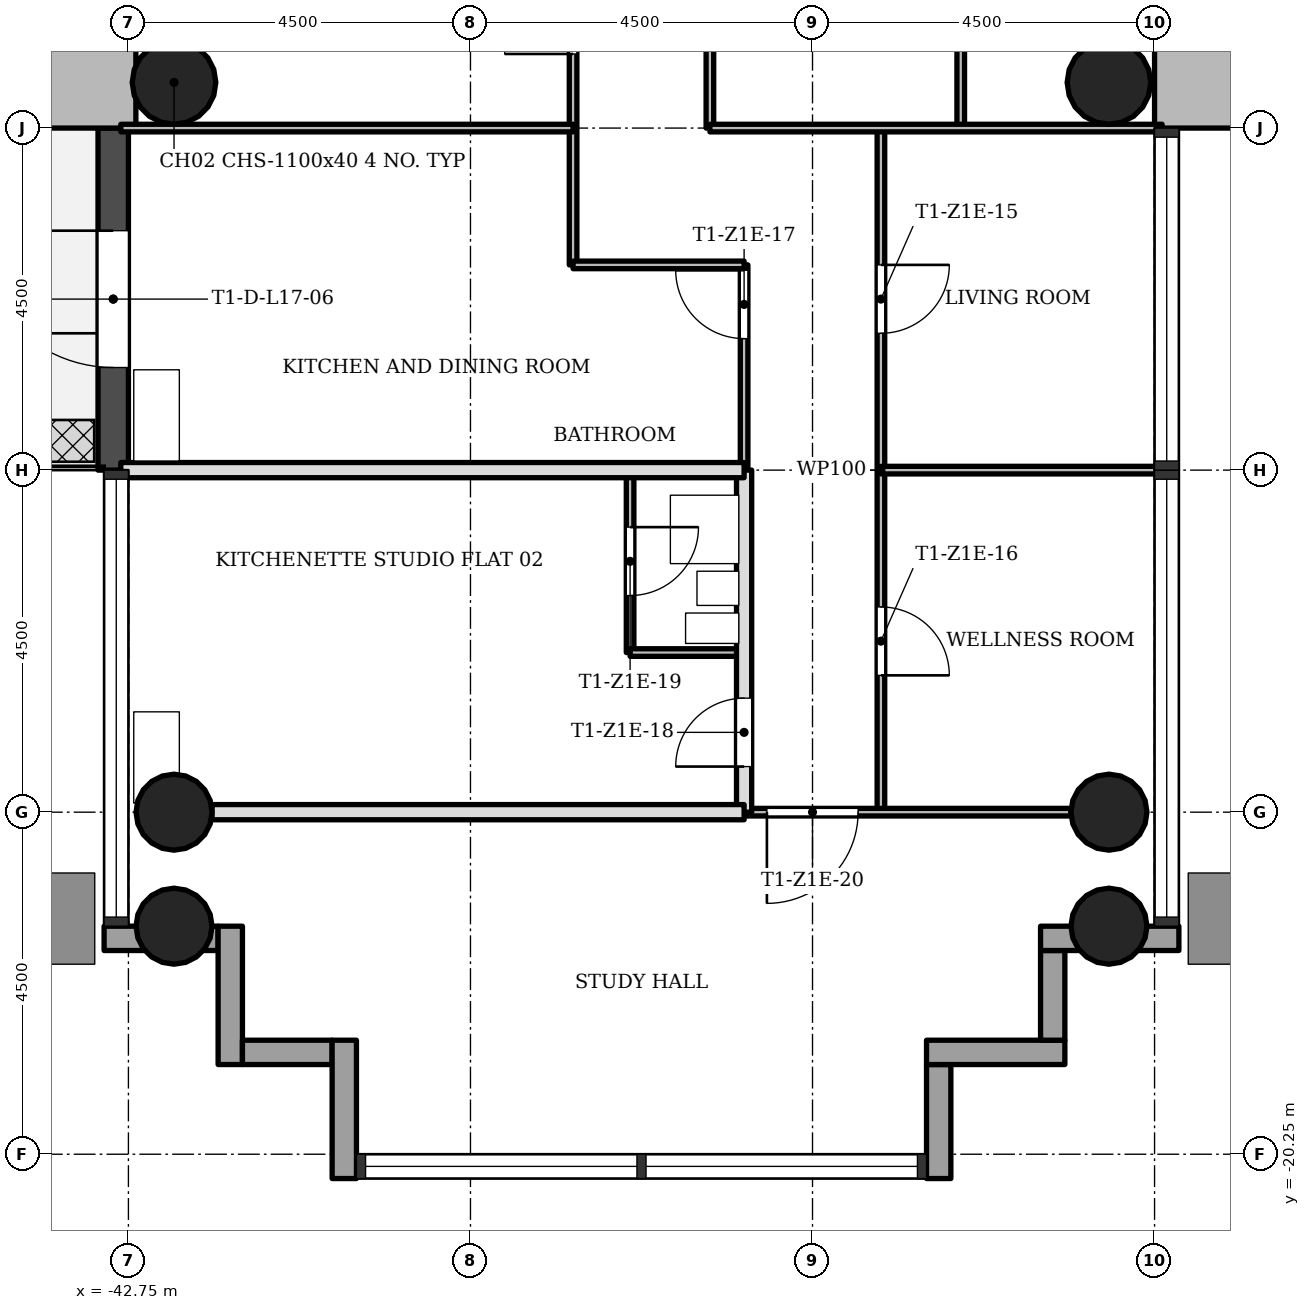
"""IFC4 building model, lengths in metres.
Left out: names, types, materials, properties, quantities, classifications, styles, units other than length and angle.
Written with IfcOpenShell. Run it as: python <this file> out.ifc"""

import sys

from ifc_helpers import new_model, si_unit, direction, frame, frame_2d, origin, origin_2d, place, context, subcontext, project, spatial, rectangle, hollow_circle, extrude, element, fill, save


model = new_model("IFC4")
c1 = context("Model", 3, precision=1e-05, world=origin(), true_north=direction((0.0, 1.0)))
c2 = subcontext(c1, "Body", "Model", "MODEL_VIEW")
j1 = project(units=[si_unit("LENGTHUNIT", "METRE"), si_unit("PLANEANGLEUNIT", "RADIAN")], contexts=[c1])
p1 = place(None, origin())
s1 = spatial("IfcSite", under=j1, at=p1, CompositionType="ELEMENT")
p2 = place(p1, origin())
s2 = spatial("IfcBuilding", under=s1, at=p2, CompositionType="ELEMENT")
p3 = place(p2, frame((0.0, 0.0, 65.3)))
s3 = spatial("IfcBuildingStorey", under=s2, at=p3, CompositionType="ELEMENT", Elevation=65.3)
p4 = place(p3, frame((-28.7, 5.65, 0.0), z_axis=(0.0, 0.0, 1.0), x_axis=(0.0, -1.0, 0.0)))
e1 = element("IfcWall", 1, at=p4, inside=s3, PredefinedType="SHEAR", context=c2, shape_type="SweptSolid", body=[
    extrude(rectangle(XDim=12.4, YDim=1.1, at=frame_2d((6.2, 0.0))), origin(), (0.0, 0.0, 1.0), 3.4),
])
p5 = place(p4, frame((4.75, 0.0, 0.0)))
e2 = element("IfcOpeningElement", 2, at=p5, cuts=e1, PredefinedType="OPENING", context=c2, shape_type="SweptSolid", body=[
    extrude(rectangle(XDim=1.8, YDim=2.1, at=frame_2d((0.9, 1.05))), frame((0.0, 0.56, 0.0), z_axis=(0.0, -1.0, 0.0), x_axis=(1.0, 0.0, 0.0)), (0.0, 0.0, 1.0), 1.12),
])
p6 = place(p3, frame((-50.65, -6.2, 0.0), z_axis=(0.0, 0.0, 1.0), x_axis=(1.0, 0.0, 0.0)))
e3 = element("IfcWall", 3, at=p6, inside=s3, PredefinedType="SHEAR", context=c2, shape_type="SweptSolid", body=[
    extrude(rectangle(XDim=7.998, YDim=1.1, at=frame_2d((3.999, 0.0))), origin(), (0.0, 0.0, 1.0), 3.4),
])
for number, where, z_axis, x_axis in (
    (4, (-42.15, -15.75, 0.0), (0.0, 0.0, 1.0), (1.0, 0.0, 0.0)),
    (5, (-29.85, -15.75, 0.0), (0.0, 0.0, 1.0), (1.0, 0.0, 0.0)),
    (6, (-42.15, -17.25, 0.0), (0.0, 0.0, 1.0), (1.0, 0.0, 0.0)),
    (7, (-29.85, -17.25, 0.0), (0.0, 0.0, 1.0), (1.0, 0.0, 0.0)),
):
    element("IfcColumn", number, at=place(p3, frame(where, z_axis=z_axis, x_axis=x_axis)), inside=s3, PredefinedType="COLUMN", context=c2, shape_type="SweptSolid", body=[
        extrude(hollow_circle(Radius=0.5, WallThickness=0.036, at=origin_2d()), origin(), (0.0, 0.0, 1.0), 3.4),
    ])
for number, where, z_axis, x_axis in (
    (8, (-42.15, -6.15, 0.0), (0.0, 0.0, 1.0), (1.0, 0.0, 0.0)),
    (9, (-29.85, -6.15, 0.0), (0.0, 0.0, 1.0), (1.0, 0.0, 0.0)),
):
    element("IfcColumn", number, at=place(p3, frame(where, z_axis=z_axis, x_axis=x_axis)), inside=s3, PredefinedType="COLUMN", context=c2, shape_type="SweptSolid", body=[
        extrude(hollow_circle(Radius=0.55, WallThickness=0.04, at=origin_2d()), origin(), (0.0, 0.0, 1.0), 3.4),
    ])
p7 = place(p3, frame((-42.95, -6.75, -0.02), z_axis=(0.0, 0.0, 1.0), x_axis=(0.0, -1.0, 0.0)))
e10 = element("IfcWall", 10, at=p7, inside=s3, PredefinedType="STANDARD", context=c2, shape_type="SweptSolid", body=[
    extrude(rectangle(XDim=4.5, YDim=0.4, at=frame_2d((2.25, 0.0))), origin(), (0.0, 0.0, 1.0), 3.12),
])
p8 = place(p7, frame((1.35, 0.0, 0.02)))
e11 = element("IfcOpeningElement", 11, at=p8, cuts=e10, PredefinedType="OPENING", context=c2, shape_type="SweptSolid", body=[
    extrude(rectangle(XDim=1.8, YDim=2.1, at=frame_2d((0.9, 1.05))), frame((0.0, 0.21, 0.0), z_axis=(0.0, -1.0, 0.0), x_axis=(1.0, 0.0, 0.0)), (0.0, 0.0, 1.0), 0.42),
])
p9 = place(p3, frame((-43.07, -17.41, -0.3), z_axis=(0.0, 0.0, 1.0), x_axis=(1.0, 0.0, 0.0)))
e12 = element("IfcWall", 12, at=p9, inside=s3, PredefinedType="STANDARD", context=c2, shape_type="SweptSolid", body=[
    extrude(rectangle(XDim=1.5, YDim=0.32, at=frame_2d((0.75, 0.0))), origin(), (0.0, 0.0, 1.0), 3.4),
])
p10 = place(p3, frame((-41.41, -17.25, -0.3), z_axis=(0.0, 0.0, 1.0), x_axis=(0.0, -1.0, 0.0)))
e13 = element("IfcWall", 13, at=p10, inside=s3, PredefinedType="STANDARD", context=c2, shape_type="SweptSolid", body=[
    extrude(rectangle(XDim=1.82, YDim=0.32, at=frame_2d((0.91, 0.0))), origin(), (0.0, 0.0, 1.0), 3.4),
])
p11 = place(p3, frame((-41.25, -18.91, -0.3), z_axis=(0.0, 0.0, 1.0), x_axis=(1.0, 0.0, 0.0)))
e14 = element("IfcWall", 14, at=p11, inside=s3, PredefinedType="STANDARD", context=c2, shape_type="SweptSolid", body=[
    extrude(rectangle(XDim=1.18, YDim=0.32, at=frame_2d((0.59, 0.0))), origin(), (0.0, 0.0, 1.0), 3.4),
])
p12 = place(p3, frame((-39.91, -18.75, -0.3), z_axis=(0.0, 0.0, 1.0), x_axis=(0.0, -1.0, 0.0)))
e15 = element("IfcWall", 15, at=p12, inside=s3, PredefinedType="STANDARD", context=c2, shape_type="SweptSolid", body=[
    extrude(rectangle(XDim=1.82, YDim=0.32, at=frame_2d((0.91, 0.0))), origin(), (0.0, 0.0, 1.0), 3.4),
])
p13 = place(p3, frame((-32.09, -20.57, -0.3), z_axis=(0.0, 0.0, 1.0), x_axis=(0.0, 1.0, 0.0)))
e16 = element("IfcWall", 16, at=p13, inside=s3, PredefinedType="STANDARD", context=c2, shape_type="SweptSolid", body=[
    extrude(rectangle(XDim=1.5, YDim=0.32, at=frame_2d((0.75, 0.0))), origin(), (0.0, 0.0, 1.0), 3.4),
])
p14 = place(p3, frame((-32.25, -18.91, -0.3), z_axis=(0.0, 0.0, 1.0), x_axis=(1.0, 0.0, 0.0)))
e17 = element("IfcWall", 17, at=p14, inside=s3, PredefinedType="STANDARD", context=c2, shape_type="SweptSolid", body=[
    extrude(rectangle(XDim=1.82, YDim=0.32, at=frame_2d((0.91, 0.0))), origin(), (0.0, 0.0, 1.0), 3.4),
])
p15 = place(p3, frame((-30.59, -18.75, -0.3), z_axis=(0.0, 0.0, 1.0), x_axis=(0.0, 1.0, 0.0)))
e18 = element("IfcWall", 18, at=p15, inside=s3, PredefinedType="STANDARD", context=c2, shape_type="SweptSolid", body=[
    extrude(rectangle(XDim=1.18, YDim=0.32, at=frame_2d((0.59, 0.0))), origin(), (0.0, 0.0, 1.0), 3.4),
])
p16 = place(p3, frame((-30.75, -17.41, -0.3), z_axis=(0.0, 0.0, 1.0), x_axis=(1.0, 0.0, 0.0)))
e19 = element("IfcWall", 19, at=p16, inside=s3, PredefinedType="STANDARD", context=c2, shape_type="SweptSolid", body=[
    extrude(rectangle(XDim=1.82, YDim=0.32, at=frame_2d((0.91, 0.0))), origin(), (0.0, 0.0, 1.0), 3.4),
])
p17 = place(p3, frame((-36.9, -8.55, 0.0), z_axis=(0.0, 0.0, 1.0), x_axis=(0.0, 1.0, 0.0)))
e20 = element("IfcWall", 20, at=p17, inside=s3, PredefinedType="PARTITIONING", context=c2, shape_type="SweptSolid", body=[
    extrude(rectangle(XDim=7.05, YDim=0.1, at=frame_2d((3.525, 0.0))), origin(), (0.0, 0.0, 1.0), 3.0),
])
p18 = place(p17, frame((5.4, 0.0, 0.0)))
e21 = element("IfcOpeningElement", 21, at=p18, cuts=e20, PredefinedType="OPENING", context=c2, shape_type="SweptSolid", body=[
    extrude(rectangle(XDim=0.9, YDim=2.1, at=frame_2d((0.45, 1.05))), frame((0.0, 0.06, 0.0), z_axis=(0.0, -1.0, 0.0), x_axis=(1.0, 0.0, 0.0)), (0.0, 0.0, 1.0), 0.12),
])
p19 = place(p17, frame((2.775, 0.0, 0.0)))
e22 = element("IfcOpeningElement", 22, at=p19, cuts=e20, PredefinedType="OPENING", context=c2, shape_type="SweptSolid", body=[
    extrude(rectangle(XDim=0.9, YDim=2.1, at=frame_2d((0.45, 1.05))), frame((0.0, 0.06, 0.0), z_axis=(0.0, -1.0, 0.0), x_axis=(1.0, 0.0, 0.0)), (0.0, 0.0, 1.0), 0.12),
])
p20 = place(p3, frame((-36.15, -13.65, 0.0), z_axis=(0.0, 0.0, 1.0), x_axis=(0.0, 1.0, 0.0)))
e23 = element("IfcWall", 23, at=p20, inside=s3, PredefinedType="PARTITIONING", context=c2, shape_type="SweptSolid", body=[
    extrude(rectangle(XDim=2.4, YDim=0.1, at=frame_2d((1.2, 0.0))), origin(), (0.0, 0.0, 1.0), 3.0),
])
p21 = place(p20, frame((0.75, 0.0, 0.0)))
e24 = element("IfcOpeningElement", 24, at=p21, cuts=e23, PredefinedType="OPENING", context=c2, shape_type="SweptSolid", body=[
    extrude(rectangle(XDim=0.9, YDim=2.1, at=frame_2d((0.45, 1.05))), frame((0.0, 0.06, 0.0), z_axis=(0.0, -1.0, 0.0), x_axis=(1.0, 0.0, 0.0)), (0.0, 0.0, 1.0), 0.12),
])
p22 = place(p3, frame((-35.1, -6.75, 0.0), z_axis=(0.0, 0.0, 1.0), x_axis=(0.0, 1.0, 0.0)))
e25 = element("IfcWall", 25, at=p22, inside=s3, PredefinedType="PARTITIONING", context=c2, shape_type="SweptSolid", body=[
    extrude(rectangle(XDim=5.25, YDim=0.1, at=frame_2d((2.625, 0.0))), origin(), (0.0, 0.0, 1.0), 3.0),
])
p23 = place(p22, frame((2.175, 0.0, 0.0)))
e26 = element("IfcOpeningElement", 26, at=p23, cuts=e25, PredefinedType="OPENING", context=c2, shape_type="SweptSolid", body=[
    extrude(rectangle(XDim=0.9, YDim=2.1, at=frame_2d((0.45, 1.05))), frame((0.0, 0.06, 0.0), z_axis=(0.0, -1.0, 0.0), x_axis=(1.0, 0.0, 0.0)), (0.0, 0.0, 1.0), 0.12),
])
p24 = place(p3, frame((-34.65, -11.25, 0.0), z_axis=(0.0, 0.0, 1.0), x_axis=(0.0, 1.0, 0.0)))
e27 = element("IfcWall", 27, at=p24, inside=s3, PredefinedType="PARTITIONING", context=c2, shape_type="SweptSolid", body=[
    extrude(rectangle(XDim=2.7, YDim=0.1, at=frame_2d((1.35, 0.0))), origin(), (0.0, 0.0, 1.0), 3.0),
])
p25 = place(p24, frame((1.73, 0.0, 0.0)))
e28 = element("IfcOpeningElement", 28, at=p25, cuts=e27, PredefinedType="OPENING", context=c2, shape_type="SweptSolid", body=[
    extrude(rectangle(XDim=0.9, YDim=2.1, at=frame_2d((0.45, 1.05))), frame((0.0, 0.06, 0.0), z_axis=(0.0, -1.0, 0.0), x_axis=(1.0, 0.0, 0.0)), (0.0, 0.0, 1.0), 0.12),
])
p26 = place(p3, frame((-34.65, -15.75, 0.0), z_axis=(0.0, 0.0, 1.0), x_axis=(0.0, 1.0, 0.0)))
e29 = element("IfcWall", 29, at=p26, inside=s3, PredefinedType="SOLIDWALL", context=c2, shape_type="SweptSolid", body=[
    extrude(rectangle(XDim=4.5, YDim=0.2, at=frame_2d((2.25, 0.0))), origin(), (0.0, 0.0, 1.0), 3.0),
])
p27 = place(p26, frame((0.6, 0.0, 0.0)))
e30 = element("IfcOpeningElement", 30, at=p27, cuts=e29, PredefinedType="OPENING", context=c2, shape_type="SweptSolid", body=[
    extrude(rectangle(XDim=0.9, YDim=2.1, at=frame_2d((0.45, 1.05))), frame((0.0, 0.11, 0.0), z_axis=(0.0, -1.0, 0.0), x_axis=(1.0, 0.0, 0.0)), (0.0, 0.0, 1.0), 0.22),
])
p28 = place(p3, frame((-32.85, -15.75, 0.0), z_axis=(0.0, 0.0, 1.0), x_axis=(0.0, 1.0, 0.0)))
e31 = element("IfcWall", 31, at=p28, inside=s3, PredefinedType="PARTITIONING", context=c2, shape_type="SweptSolid", body=[
    extrude(rectangle(XDim=9.0, YDim=0.1, at=frame_2d((4.5, 0.0))), origin(), (0.0, 0.0, 1.0), 3.0),
])
p29 = place(p28, frame((6.3, 0.0, 0.0)))
e32 = element("IfcOpeningElement", 32, at=p29, cuts=e31, PredefinedType="OPENING", context=c2, shape_type="SweptSolid", body=[
    extrude(rectangle(XDim=0.9, YDim=2.1, at=frame_2d((0.45, 1.05))), frame((0.0, 0.06, 0.0), z_axis=(0.0, -1.0, 0.0), x_axis=(1.0, 0.0, 0.0)), (0.0, 0.0, 1.0), 0.12),
])
p30 = place(p28, frame((1.8, 0.0, 0.0)))
e33 = element("IfcOpeningElement", 33, at=p30, cuts=e31, PredefinedType="OPENING", context=c2, shape_type="SweptSolid", body=[
    extrude(rectangle(XDim=0.9, YDim=2.1, at=frame_2d((0.45, 1.05))), frame((0.0, 0.06, 0.0), z_axis=(0.0, -1.0, 0.0), x_axis=(1.0, 0.0, 0.0)), (0.0, 0.0, 1.0), 0.12),
])
p31 = place(p3, frame((-31.8, -6.75, 0.0), z_axis=(0.0, 0.0, 1.0), x_axis=(0.0, 1.0, 0.0)))
e34 = element("IfcWall", 34, at=p31, inside=s3, PredefinedType="PARTITIONING", context=c2, shape_type="SweptSolid", body=[
    extrude(rectangle(XDim=5.25, YDim=0.1, at=frame_2d((2.625, 0.0))), origin(), (0.0, 0.0, 1.0), 3.0),
])
p32 = place(p3, frame((-34.65, -15.75, 0.0), z_axis=(0.0, 0.0, 1.0), x_axis=(1.0, 0.0, 0.0)))
e35 = element("IfcWall", 35, at=p32, inside=s3, PredefinedType="PARTITIONING", context=c2, shape_type="SweptSolid", body=[
    extrude(rectangle(XDim=4.3, YDim=0.1, at=frame_2d((2.15, 0.0))), origin(), (0.0, 0.0, 1.0), 3.0),
])
p33 = place(p32, frame((0.3, 0.0, 0.0)))
e36 = element("IfcOpeningElement", 36, at=p33, cuts=e35, PredefinedType="OPENING", context=c2, shape_type="SweptSolid", body=[
    extrude(rectangle(XDim=1.2, YDim=2.1, at=frame_2d((0.6, 1.05))), frame((0.0, 0.06, 0.0), z_axis=(0.0, -1.0, 0.0), x_axis=(1.0, 0.0, 0.0)), (0.0, 0.0, 1.0), 0.12),
])
p34 = place(p3, frame((-41.65, -15.75, 0.0), z_axis=(0.0, 0.0, 1.0), x_axis=(1.0, 0.0, 0.0)))
e37 = element("IfcWall", 37, at=p34, inside=s3, PredefinedType="SOLIDWALL", context=c2, shape_type="SweptSolid", body=[
    extrude(rectangle(XDim=7.0, YDim=0.2, at=frame_2d((3.5, 0.0))), origin(), (0.0, 0.0, 1.0), 3.0),
])
p35 = place(p3, frame((-36.15, -13.65, 0.0), z_axis=(0.0, 0.0, 1.0), x_axis=(1.0, 0.0, 0.0)))
e38 = element("IfcWall", 38, at=p35, inside=s3, PredefinedType="PARTITIONING", context=c2, shape_type="SweptSolid", body=[
    extrude(rectangle(XDim=1.5, YDim=0.1, at=frame_2d((0.75, 0.0))), origin(), (0.0, 0.0, 1.0), 3.0),
])
p36 = place(p3, frame((-32.85, -11.25, 0.0), z_axis=(0.0, 0.0, 1.0), x_axis=(1.0, 0.0, 0.0)))
e39 = element("IfcWall", 39, at=p36, inside=s3, PredefinedType="PARTITIONING", context=c2, shape_type="SweptSolid", body=[
    extrude(rectangle(XDim=3.7, YDim=0.1, at=frame_2d((1.85, 0.0))), origin(), (0.0, 0.0, 1.0), 3.0),
])
p37 = place(p3, frame((-42.85, -11.25, 0.0), z_axis=(0.0, 0.0, 1.0), x_axis=(1.0, 0.0, 0.0)))
e40 = element("IfcWall", 40, at=p37, inside=s3, PredefinedType="SOLIDWALL", context=c2, shape_type="SweptSolid", body=[
    extrude(rectangle(XDim=8.2, YDim=0.2, at=frame_2d((4.1, 0.0))), origin(), (0.0, 0.0, 1.0), 3.0),
])
p38 = place(p3, frame((-36.9, -8.55, 0.0), z_axis=(0.0, 0.0, 1.0), x_axis=(1.0, 0.0, 0.0)))
e41 = element("IfcWall", 41, at=p38, inside=s3, PredefinedType="PARTITIONING", context=c2, shape_type="SweptSolid", body=[
    extrude(rectangle(XDim=2.25, YDim=0.1, at=frame_2d((1.125, 0.0))), origin(), (0.0, 0.0, 1.0), 3.0),
])
for number, where, z_axis, x_axis in (
    (42, (-42.85, -6.75, 0.0), (0.0, 0.0, 1.0), (1.0, 0.0, 0.0)),
    (43, (-35.1, -6.75, 0.0), (0.0, 0.0, 1.0), (1.0, 0.0, 0.0)),
):
    element("IfcWall", number, at=place(p3, frame(where, z_axis=z_axis, x_axis=x_axis)), inside=s3, PredefinedType="PARTITIONING", context=c2, shape_type="SweptSolid", body=[
        extrude(rectangle(XDim=5.95, YDim=0.1, at=frame_2d((2.975, 0.0))), origin(), (0.0, 0.0, 1.0), 3.0),
    ])
p39 = place(p8, origin())
e44 = element("IfcDoor", 44, at=p39, inside=s3, OperationType="SINGLE_SWING_LEFT", PredefinedType="DOOR", context=c2, shape_type="SweptSolid", body=[
    extrude(rectangle(XDim=1.8, YDim=2.1, at=frame_2d((0.9, 1.05))), frame((0.0, 0.025, 0.0), z_axis=(0.0, -1.0, 0.0), x_axis=(1.0, 0.0, 0.0)), (0.0, 0.0, 1.0), 0.05),
])
fill(e11, e44)
p40 = place(p19, origin())
e45 = element("IfcDoor", 45, at=p40, inside=s3, OperationType="SINGLE_SWING_RIGHT", PredefinedType="DOOR", context=c2, shape_type="SweptSolid", body=[
    extrude(rectangle(XDim=0.9, YDim=2.1, at=frame_2d((0.45, 1.05))), frame((0.0, 0.025, 0.0), z_axis=(0.0, -1.0, 0.0), x_axis=(1.0, 0.0, 0.0)), (0.0, 0.0, 1.0), 0.05),
])
fill(e22, e45)
p41 = place(p29, origin())
e46 = element("IfcDoor", 46, at=p41, inside=s3, OperationType="SINGLE_SWING_RIGHT", PredefinedType="DOOR", context=c2, shape_type="SweptSolid", body=[
    extrude(rectangle(XDim=0.9, YDim=2.1, at=frame_2d((0.45, 1.05))), frame((0.0, 0.025, 0.0), z_axis=(0.0, -1.0, 0.0), x_axis=(1.0, 0.0, 0.0)), (0.0, 0.0, 1.0), 0.05),
])
fill(e32, e46)
p42 = place(p30, origin())
e47 = element("IfcDoor", 47, at=p42, inside=s3, OperationType="SINGLE_SWING_LEFT", PredefinedType="DOOR", context=c2, shape_type="SweptSolid", body=[
    extrude(rectangle(XDim=0.9, YDim=2.1, at=frame_2d((0.45, 1.05))), frame((0.0, 0.025, 0.0), z_axis=(0.0, -1.0, 0.0), x_axis=(1.0, 0.0, 0.0)), (0.0, 0.0, 1.0), 0.05),
])
fill(e33, e47)
p43 = place(p25, origin())
e48 = element("IfcDoor", 48, at=p43, inside=s3, OperationType="SINGLE_SWING_LEFT", PredefinedType="DOOR", context=c2, shape_type="SweptSolid", body=[
    extrude(rectangle(XDim=0.9, YDim=2.1, at=frame_2d((0.45, 1.05))), frame((0.0, 0.025, 0.0), z_axis=(0.0, -1.0, 0.0), x_axis=(1.0, 0.0, 0.0)), (0.0, 0.0, 1.0), 0.05),
])
fill(e28, e48)
p44 = place(p27, origin())
e49 = element("IfcDoor", 49, at=p44, inside=s3, OperationType="SINGLE_SWING_RIGHT", PredefinedType="DOOR", context=c2, shape_type="SweptSolid", body=[
    extrude(rectangle(XDim=0.9, YDim=2.1, at=frame_2d((0.45, 1.05))), frame((0.0, 0.025, 0.0), z_axis=(0.0, -1.0, 0.0), x_axis=(1.0, 0.0, 0.0)), (0.0, 0.0, 1.0), 0.05),
])
fill(e30, e49)
p45 = place(p21, origin())
e50 = element("IfcDoor", 50, at=p45, inside=s3, OperationType="SINGLE_SWING_RIGHT", PredefinedType="DOOR", context=c2, shape_type="SweptSolid", body=[
    extrude(rectangle(XDim=0.9, YDim=2.1, at=frame_2d((0.45, 1.05))), frame((0.0, 0.025, 0.0), z_axis=(0.0, -1.0, 0.0), x_axis=(1.0, 0.0, 0.0)), (0.0, 0.0, 1.0), 0.05),
])
fill(e24, e50)
p46 = place(p33, origin())
e51 = element("IfcDoor", 51, at=p46, inside=s3, OperationType="SINGLE_SWING_LEFT", PredefinedType="DOOR", context=c2, shape_type="SweptSolid", body=[
    extrude(rectangle(XDim=1.2, YDim=2.1, at=frame_2d((0.6, 1.05))), frame((0.0, 0.025, 0.0), z_axis=(0.0, -1.0, 0.0), x_axis=(1.0, 0.0, 0.0)), (0.0, 0.0, 1.0), 0.05),
])
fill(e36, e51)
save(model, sys.argv[1])
